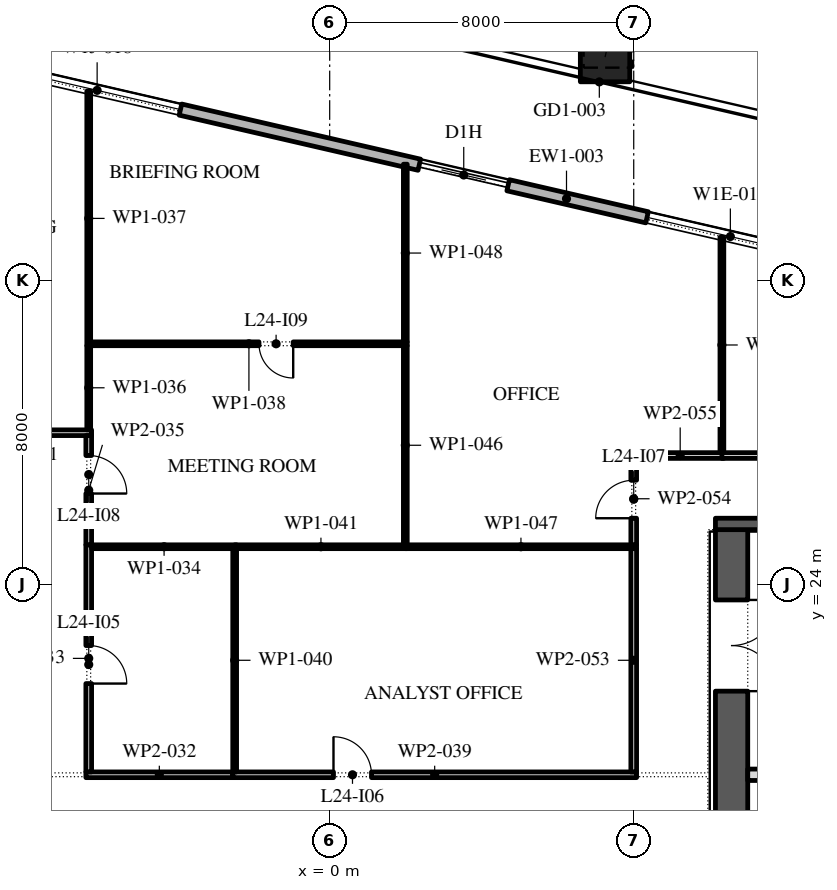
"""IFC4 building model, lengths in metres.
Left out: names, types, materials, properties, quantities, classifications, styles, units other than length and angle.
Written with IfcOpenShell. Run it as: python <this file> out.ifc"""

import sys

from ifc_helpers import new_model, si_unit, direction, frame, frame_2d, origin, origin_2d, place, context, subcontext, project, spatial, rectangle, extrude, element, fill, save


model = new_model("IFC4")
c1 = context("Model", 3, precision=1e-05, world=origin(), true_north=direction((0.0, 1.0)))
c2 = subcontext(c1, "Body", "Model", "MODEL_VIEW")
j1 = project(units=[si_unit("LENGTHUNIT", "METRE"), si_unit("PLANEANGLEUNIT", "RADIAN")], contexts=[c1])
p1 = place(None, origin())
s1 = spatial("IfcSite", under=j1, at=p1, CompositionType="ELEMENT")
p2 = place(p1, origin())
s2 = spatial("IfcBuilding", under=s1, at=p2, CompositionType="ELEMENT")
p3 = place(p2, frame((0.0, 0.0, 114.0)))
s3 = spatial("IfcBuildingStorey", under=s2, at=p3, CompositionType="ELEMENT", Elevation=114.0)
p4 = place(p3, frame((7.246, 37.884, 0.0), z_axis=(0.020319626563, 0.088225387128, 0.995893264282), x_axis=(-0.974488096918, 0.224439187676, 0.0)))
e1 = element("IfcColumn", 1, at=p4, inside=s3, PredefinedType="COLUMN", context=c2, shape_type="SweptSolid", body=[
    extrude(rectangle(XDim=1.3, YDim=1.3, at=origin_2d()), origin(), (0.0, 0.0, 1.0), 4.217),
])
p5 = place(p3, frame((31.078, 28.421, 0.0), z_axis=(0.0, 0.0, 1.0), x_axis=(-0.974370456532, 0.224949357493, 0.0)))
e2 = element("IfcWall", 2, at=p5, inside=s3, PredefinedType="STANDARD", context=c2, shape_type="SweptSolid", body=[
    extrude(rectangle(XDim=51.0, YDim=0.3, at=frame_2d((25.5, 0.0))), origin(), (0.0, 0.0, 1.0), 4.0),
])
p6 = place(p5, frame((1.875, 0.0, 0.45)))
e3 = element("IfcOpeningElement", 3, at=p6, cuts=e2, PredefinedType="OPENING", context=c2, shape_type="SweptSolid", body=[
    extrude(rectangle(XDim=4.5, YDim=3.0, at=frame_2d((2.25, 1.5))), frame((0.0, 0.16, 0.0), z_axis=(0.0, -1.0, 0.0), x_axis=(1.0, 0.0, 0.0)), (0.0, 0.0, 1.0), 0.32),
])
p7 = place(p5, frame((10.275, 0.0, 0.45)))
e4 = element("IfcOpeningElement", 4, at=p7, cuts=e2, PredefinedType="OPENING", context=c2, shape_type="SweptSolid", body=[
    extrude(rectangle(XDim=4.5, YDim=2.875, at=frame_2d((2.25, 1.438))), frame((0.0, 0.16, 0.0), z_axis=(0.0, -1.0, 0.0), x_axis=(1.0, 0.0, 0.0)), (0.0, 0.0, 1.0), 0.32),
])
p8 = place(p5, frame((18.825, 0.0, 0.45)))
e5 = element("IfcOpeningElement", 5, at=p8, cuts=e2, PredefinedType="OPENING", context=c2, shape_type="SweptSolid", body=[
    extrude(rectangle(XDim=4.5, YDim=2.825, at=frame_2d((2.25, 1.413))), frame((0.0, 0.16, 0.0), z_axis=(0.0, -1.0, 0.0), x_axis=(1.0, 0.0, 0.0)), (0.0, 0.0, 1.0), 0.32),
])
p9 = place(p5, frame((27.075, 0.0, 0.0)))
e6 = element("IfcOpeningElement", 6, at=p9, cuts=e2, PredefinedType="OPENING", context=c2, shape_type="SweptSolid", body=[
    extrude(rectangle(XDim=2.4, YDim=3.2, at=frame_2d((1.2, 1.6))), frame((0.0, 0.16, 0.0), z_axis=(0.0, -1.0, 0.0), x_axis=(1.0, 0.0, 0.0)), (0.0, 0.0, 1.0), 0.32),
])
p10 = place(p5, frame((35.925, 0.0, 0.45)))
e7 = element("IfcOpeningElement", 7, at=p10, cuts=e2, PredefinedType="OPENING", context=c2, shape_type="SweptSolid", body=[
    extrude(rectangle(XDim=4.5, YDim=2.675, at=frame_2d((2.25, 1.337))), frame((0.0, 0.16, 0.0), z_axis=(0.0, -1.0, 0.0), x_axis=(1.0, 0.0, 0.0)), (0.0, 0.0, 1.0), 0.32),
])
p11 = place(p5, frame((44.475, 0.0, 0.45)))
e8 = element("IfcOpeningElement", 8, at=p11, cuts=e2, PredefinedType="OPENING", context=c2, shape_type="SweptSolid", body=[
    extrude(rectangle(XDim=4.5, YDim=3.05, at=frame_2d((2.25, 1.525))), frame((0.0, 0.16, 0.0), z_axis=(0.0, -1.0, 0.0), x_axis=(1.0, 0.0, 0.0)), (0.0, 0.0, 1.0), 0.32),
])
p12 = place(p3, frame((10.575, -2.45, 0.0), z_axis=(0.0, 0.0, 1.0), x_axis=(0.0, 1.0, 0.0)))
e9 = element("IfcWall", 9, at=p12, inside=s3, PredefinedType="SHEAR", context=c2, shape_type="SweptSolid", body=[
    extrude(rectangle(XDim=27.9, YDim=0.85, at=frame_2d((13.95, 0.0))), origin(), (0.0, 0.0, 1.0), 4.0),
])
p13 = place(p12, frame((23.65, 0.0, 0.0)))
e10 = element("IfcOpeningElement", 10, at=p13, cuts=e9, PredefinedType="OPENING", context=c2, shape_type="SweptSolid", body=[
    extrude(rectangle(XDim=2.4, YDim=2.1, at=frame_2d((1.2, 1.05))), frame((0.0, 0.435, 0.0), z_axis=(0.0, -1.0, 0.0), x_axis=(1.0, 0.0, 0.0)), (0.0, 0.0, 1.0), 0.87),
])
p14 = place(p12, frame((1.387, 0.0, 0.0)))
e11 = element("IfcOpeningElement", 11, at=p14, cuts=e9, PredefinedType="OPENING", context=c2, shape_type="SweptSolid", body=[
    extrude(rectangle(XDim=0.9, YDim=2.1, at=frame_2d((0.45, 1.05))), frame((0.0, 0.435, 0.0), z_axis=(0.0, -1.0, 0.0), x_axis=(1.0, 0.0, 0.0)), (0.0, 0.0, 1.0), 0.87),
])
p15 = place(p12, frame((4.562, 0.0, 0.0)))
e12 = element("IfcOpeningElement", 12, at=p15, cuts=e9, PredefinedType="OPENING", context=c2, shape_type="SweptSolid", body=[
    extrude(rectangle(XDim=1.0, YDim=2.1, at=frame_2d((0.5, 1.05))), frame((0.0, 0.435, 0.0), z_axis=(0.0, -1.0, 0.0), x_axis=(1.0, 0.0, 0.0)), (0.0, 0.0, 1.0), 0.87),
])
p16 = place(p3, frame((10.15, 25.6, 0.0), z_axis=(0.0, 0.0, 1.0), x_axis=(1.0, 0.0, 0.0)))
e13 = element("IfcWall", 13, at=p16, inside=s3, PredefinedType="SHEAR", context=c2, shape_type="SweptSolid", body=[
    extrude(rectangle(XDim=11.7, YDim=0.3, at=frame_2d((5.85, 0.0))), origin(), (0.0, 0.0, 1.0), 4.0),
])
p17 = place(p3, frame((11.0, 19.0, 0.0), z_axis=(0.0, 0.0, 1.0), x_axis=(1.0, 0.0, 0.0)))
e14 = element("IfcWall", 14, at=p17, inside=s3, PredefinedType="PARTITIONING", context=c2, shape_type="SweptSolid", body=[
    extrude(rectangle(XDim=3.0, YDim=0.3, at=frame_2d((1.5, 0.0))), origin(), (0.0, 0.0, 1.0), 4.0),
])
p18 = place(p3, frame((-10.27, 28.0, 0.0), z_axis=(0.0, 0.0, 1.0), x_axis=(1.0, 0.0, 0.0)))
e15 = element("IfcWall", 15, at=p18, inside=s3, PredefinedType="PARTITIONING", context=c2, shape_type="SweptSolid", body=[
    extrude(rectangle(XDim=4.005, YDim=0.15, at=frame_2d((2.002, 0.0))), origin(), (0.0, 0.0, 1.0), 4.0),
])
p19 = place(p18, frame((1.78, 0.0, 0.0)))
e16 = element("IfcOpeningElement", 16, at=p19, cuts=e15, PredefinedType="OPENING", context=c2, shape_type="SweptSolid", body=[
    extrude(rectangle(XDim=1.0, YDim=2.1, at=frame_2d((0.5, 1.05))), frame((0.0, 0.085, 0.0), z_axis=(0.0, -1.0, 0.0), x_axis=(1.0, 0.0, 0.0)), (0.0, 0.0, 1.0), 0.17),
])
p20 = place(p3, frame((-6.415, 19.0, 0.0), z_axis=(0.0, 0.0, 1.0), x_axis=(1.0, 0.0, 0.0)))
e17 = element("IfcWall", 17, at=p20, inside=s3, PredefinedType="PARTITIONING", context=c2, shape_type="SweptSolid", body=[
    extrude(rectangle(XDim=3.865, YDim=0.15, at=frame_2d((1.933, 0.0))), origin(), (0.0, 0.0, 1.0), 4.0),
])
p21 = place(p3, frame((-6.34, 25.05, 0.0), z_axis=(0.0, 0.0, 1.0), x_axis=(0.0, -1.0, 0.0)))
e18 = element("IfcWall", 18, at=p21, inside=s3, PredefinedType="PARTITIONING", context=c2, shape_type="SweptSolid", body=[
    extrude(rectangle(XDim=5.975, YDim=0.15, at=frame_2d((2.988, 0.0))), origin(), (0.0, 0.0, 1.0), 4.0),
])
p22 = place(p21, frame((2.65, 0.0, 0.0)))
e19 = element("IfcOpeningElement", 19, at=p22, cuts=e18, PredefinedType="OPENING", context=c2, shape_type="SweptSolid", body=[
    extrude(rectangle(XDim=1.0, YDim=2.1, at=frame_2d((0.5, 1.05))), frame((0.0, 0.085, 0.0), z_axis=(0.0, -1.0, 0.0), x_axis=(1.0, 0.0, 0.0)), (0.0, 0.0, 1.0), 0.17),
])
p23 = place(p3, frame((-6.265, 25.0, 0.0), z_axis=(0.0, 0.0, 1.0), x_axis=(1.0, 0.0, 0.0)))
e20 = element("IfcWall", 20, at=p23, inside=s3, PredefinedType="PARTITIONING", context=c2, shape_type="SweptSolid", body=[
    extrude(rectangle(XDim=3.815, YDim=0.1, at=frame_2d((1.907, 0.0))), origin(), (0.0, 0.0, 1.0), 4.0),
])
p24 = place(p3, frame((-6.34, 27.925, 0.0), z_axis=(0.0, 0.0, 1.0), x_axis=(0.0, -1.0, 0.0)))
e21 = element("IfcWall", 21, at=p24, inside=s3, PredefinedType="PARTITIONING", context=c2, shape_type="SweptSolid", body=[
    extrude(rectangle(XDim=2.875, YDim=0.15, at=frame_2d((1.438, 0.0))), origin(), (0.0, 0.0, 1.0), 4.0),
])
p25 = place(p24, frame((0.525, 0.0, 0.0)))
e22 = element("IfcOpeningElement", 22, at=p25, cuts=e21, PredefinedType="OPENING", context=c2, shape_type="SweptSolid", body=[
    extrude(rectangle(XDim=1.0, YDim=2.1, at=frame_2d((0.5, 1.05))), frame((0.0, 0.085, 0.0), z_axis=(0.0, -1.0, 0.0), x_axis=(1.0, 0.0, 0.0)), (0.0, 0.0, 1.0), 0.17),
])
p26 = place(p3, frame((-6.34, 28.075, 0.0), z_axis=(0.0, 0.0, 1.0), x_axis=(0.0, 1.0, 0.0)))
e23 = element("IfcWall", 23, at=p26, inside=s3, PredefinedType="PARTITIONING", context=c2, shape_type="SweptSolid", body=[
    extrude(rectangle(XDim=2.215, YDim=0.1, at=frame_2d((1.107, 0.0))), origin(), (0.0, 0.0, 1.0), 4.0),
])
p27 = place(p3, frame((-6.34, 30.29, 0.0), z_axis=(0.0, 0.0, 1.0), x_axis=(0.0, 1.0, 0.0)))
e24 = element("IfcWall", 24, at=p27, inside=s3, PredefinedType="PARTITIONING", context=c2, shape_type="SweptSolid", body=[
    extrude(rectangle(XDim=6.698, YDim=0.1, at=frame_2d((3.349, 0.0))), origin(), (0.0, 0.0, 1.0), 4.0),
])
p28 = place(p3, frame((-6.29, 30.34, 0.0), z_axis=(0.0, 0.0, 1.0), x_axis=(1.0, 0.0, 0.0)))
e25 = element("IfcWall", 25, at=p28, inside=s3, PredefinedType="PARTITIONING", context=c2, shape_type="SweptSolid", body=[
    extrude(rectangle(XDim=8.33, YDim=0.1, at=frame_2d((4.165, 0.0))), origin(), (0.0, 0.0, 1.0), 4.0),
])
p29 = place(p28, frame((4.43, 0.0, 0.0)))
e26 = element("IfcOpeningElement", 26, at=p29, cuts=e25, PredefinedType="OPENING", context=c2, shape_type="SweptSolid", body=[
    extrude(rectangle(XDim=0.9, YDim=2.1, at=frame_2d((0.45, 1.05))), frame((0.0, 0.06, 0.0), z_axis=(0.0, -1.0, 0.0), x_axis=(1.0, 0.0, 0.0)), (0.0, 0.0, 1.0), 0.12),
])
p30 = place(p3, frame((-2.55, 19.0, 0.0), z_axis=(0.0, 0.0, 1.0), x_axis=(1.0, 0.0, 0.0)))
e27 = element("IfcWall", 27, at=p30, inside=s3, PredefinedType="PARTITIONING", context=c2, shape_type="SweptSolid", body=[
    extrude(rectangle(XDim=10.625, YDim=0.15, at=frame_2d((5.312, 0.0))), origin(), (0.0, 0.0, 1.0), 4.0),
])
p31 = place(p30, frame((2.65, 0.0, 0.0)))
e28 = element("IfcOpeningElement", 28, at=p31, cuts=e27, PredefinedType="OPENING", context=c2, shape_type="SweptSolid", body=[
    extrude(rectangle(XDim=1.0, YDim=2.1, at=frame_2d((0.5, 1.05))), frame((0.0, 0.085, 0.0), z_axis=(0.0, -1.0, 0.0), x_axis=(1.0, 0.0, 0.0)), (0.0, 0.0, 1.0), 0.17),
])
p32 = place(p3, frame((-2.5, 24.95, 0.0), z_axis=(0.0, 0.0, 1.0), x_axis=(0.0, -1.0, 0.0)))
e29 = element("IfcWall", 29, at=p32, inside=s3, PredefinedType="PARTITIONING", context=c2, shape_type="SweptSolid", body=[
    extrude(rectangle(XDim=5.875, YDim=0.1, at=frame_2d((2.938, 0.0))), origin(), (0.0, 0.0, 1.0), 4.0),
])
p33 = place(p3, frame((-2.5, 25.0, 0.0), z_axis=(0.0, 0.0, 1.0), x_axis=(1.0, 0.0, 0.0)))
e30 = element("IfcWall", 30, at=p33, inside=s3, PredefinedType="PARTITIONING", context=c2, shape_type="SweptSolid", body=[
    extrude(rectangle(XDim=4.54, YDim=0.1, at=frame_2d((2.27, 0.0))), origin(), (0.0, 0.0, 1.0), 4.0),
])
p34 = place(p3, frame((1.99, 25.05, 0.0), z_axis=(0.0, 0.0, 1.0), x_axis=(0.0, 1.0, 0.0)))
e31 = element("IfcWall", 31, at=p34, inside=s3, PredefinedType="PARTITIONING", context=c2, shape_type="SweptSolid", body=[
    extrude(rectangle(XDim=5.24, YDim=0.1, at=frame_2d((2.62, 0.0))), origin(), (0.0, 0.0, 1.0), 4.0),
])
p35 = place(p3, frame((1.99, 25.0, 0.0), z_axis=(0.0, 0.0, 1.0), x_axis=(1.0, 0.0, 0.0)))
e32 = element("IfcWall", 32, at=p35, inside=s3, PredefinedType="PARTITIONING", context=c2, shape_type="SweptSolid", body=[
    extrude(rectangle(XDim=6.085, YDim=0.1, at=frame_2d((3.042, 0.0))), origin(), (0.0, 0.0, 1.0), 4.0),
])
p36 = place(p3, frame((1.99, 30.39, 0.0), z_axis=(0.0, 0.0, 1.0), x_axis=(0.0, 1.0, 0.0)))
e33 = element("IfcWall", 33, at=p36, inside=s3, PredefinedType="PARTITIONING", context=c2, shape_type="SweptSolid", body=[
    extrude(rectangle(XDim=4.675, YDim=0.1, at=frame_2d((2.337, 0.0))), origin(), (0.0, 0.0, 1.0), 4.0),
])
p37 = place(p3, frame((8.0, 19.075, 0.0), z_axis=(0.0, 0.0, 1.0), x_axis=(0.0, 1.0, 0.0)))
e34 = element("IfcWall", 34, at=p37, inside=s3, PredefinedType="PARTITIONING", context=c2, shape_type="SweptSolid", body=[
    extrude(rectangle(XDim=5.875, YDim=0.15, at=frame_2d((2.938, 0.0))), origin(), (0.0, 0.0, 1.0), 4.0),
])
p38 = place(p3, frame((8.0, 25.05, 0.0), z_axis=(0.0, 0.0, 1.0), x_axis=(0.0, 1.0, 0.0)))
e35 = element("IfcWall", 35, at=p38, inside=s3, PredefinedType="PARTITIONING", context=c2, shape_type="SweptSolid", body=[
    extrude(rectangle(XDim=2.425, YDim=0.15, at=frame_2d((1.212, 0.0))), origin(), (0.0, 0.0, 1.0), 4.0),
])
p39 = place(p38, frame((0.7, 0.0, 0.0)))
e36 = element("IfcOpeningElement", 36, at=p39, cuts=e35, PredefinedType="OPENING", context=c2, shape_type="SweptSolid", body=[
    extrude(rectangle(XDim=1.0, YDim=2.1, at=frame_2d((0.5, 1.05))), frame((0.0, 0.085, 0.0), z_axis=(0.0, -1.0, 0.0), x_axis=(1.0, 0.0, 0.0)), (0.0, 0.0, 1.0), 0.17),
])
p40 = place(p3, frame((8.075, 27.4, 0.0), z_axis=(0.0, 0.0, 1.0), x_axis=(1.0, 0.0, 0.0)))
e37 = element("IfcWall", 37, at=p40, inside=s3, PredefinedType="PARTITIONING", context=c2, shape_type="SweptSolid", body=[
    extrude(rectangle(XDim=2.295, YDim=0.15, at=frame_2d((1.147, 0.0))), origin(), (0.0, 0.0, 1.0), 4.0),
])
p41 = place(p3, frame((10.32, 27.475, 0.0), z_axis=(0.0, 0.0, 1.0), x_axis=(0.0, 1.0, 0.0)))
e38 = element("IfcWall", 38, at=p41, inside=s3, PredefinedType="PARTITIONING", context=c2, shape_type="SweptSolid", body=[
    extrude(rectangle(XDim=5.667, YDim=0.1, at=frame_2d((2.833, 0.0))), origin(), (0.0, 0.0, 1.0), 4.0),
])
p42 = place(p3, frame((10.32, 27.4, 0.0), z_axis=(0.0, 0.0, 1.0), x_axis=(1.0, 0.0, 0.0)))
e39 = element("IfcWall", 39, at=p42, inside=s3, PredefinedType="PARTITIONING", context=c2, shape_type="SweptSolid", body=[
    extrude(rectangle(XDim=8.38, YDim=0.15, at=frame_2d((4.19, 0.0))), origin(), (0.0, 0.0, 1.0), 4.0),
])
p43 = place(p42, frame((4.43, 0.0, 0.0)))
e40 = element("IfcOpeningElement", 40, at=p43, cuts=e39, PredefinedType="OPENING", context=c2, shape_type="SweptSolid", body=[
    extrude(rectangle(XDim=1.0, YDim=2.1, at=frame_2d((0.5, 1.05))), frame((0.0, 0.085, 0.0), z_axis=(0.0, -1.0, 0.0), x_axis=(1.0, 0.0, 0.0)), (0.0, 0.0, 1.0), 0.17),
])
p44 = place(p8, origin())
e41 = element("IfcWindow", 41, at=p44, inside=s3, PartitioningType="DOUBLE_PANEL_VERTICAL", PredefinedType="WINDOW", context=c2, shape_type="SweptSolid", body=[
    extrude(rectangle(XDim=4.5, YDim=2.825, at=frame_2d((2.25, 1.413))), frame((0.0, 0.03, 0.0), z_axis=(0.0, -1.0, 0.0), x_axis=(1.0, 0.0, 0.0)), (0.0, 0.0, 1.0), 0.06),
])
fill(e5, e41)
p45 = place(p9, origin())
e42 = element("IfcDoor", 42, at=p45, inside=s3, OperationType="DOUBLE_DOOR_SLIDING", PredefinedType="DOOR", context=c2, shape_type="SweptSolid", body=[
    extrude(rectangle(XDim=2.4, YDim=3.2, at=frame_2d((1.2, 1.6))), frame((0.0, 0.025, 0.0), z_axis=(0.0, -1.0, 0.0), x_axis=(1.0, 0.0, 0.0)), (0.0, 0.0, 1.0), 0.05),
])
fill(e6, e42)
p46 = place(p10, origin())
e43 = element("IfcWindow", 43, at=p46, inside=s3, PartitioningType="DOUBLE_PANEL_VERTICAL", PredefinedType="WINDOW", context=c2, shape_type="SweptSolid", body=[
    extrude(rectangle(XDim=4.5, YDim=2.675, at=frame_2d((2.25, 1.337))), frame((0.0, 0.03, 0.0), z_axis=(0.0, -1.0, 0.0), x_axis=(1.0, 0.0, 0.0)), (0.0, 0.0, 1.0), 0.06),
])
fill(e7, e43)
p47 = place(p13, frame((2.4, 0.0, 0.0), z_axis=(0.0, 0.0, 1.0), x_axis=(-1.0, 0.0, 0.0)))
e44 = element("IfcDoor", 44, at=p47, inside=s3, OperationType="DOUBLE_DOOR_SINGLE_SWING", PredefinedType="DOOR", context=c2, shape_type="SweptSolid", body=[
    extrude(rectangle(XDim=2.4, YDim=2.1, at=frame_2d((1.2, 1.05))), frame((0.0, 0.025, 0.0), z_axis=(0.0, -1.0, 0.0), x_axis=(1.0, 0.0, 0.0)), (0.0, 0.0, 1.0), 0.05),
])
fill(e10, e44)
p48 = place(p22, origin())
e45 = element("IfcDoor", 45, at=p48, inside=s3, OperationType="SINGLE_SWING_LEFT", PredefinedType="DOOR", context=c2, shape_type="SweptSolid", body=[
    extrude(rectangle(XDim=1.0, YDim=2.1, at=frame_2d((0.5, 1.05))), frame((0.0, 0.025, 0.0), z_axis=(0.0, -1.0, 0.0), x_axis=(1.0, 0.0, 0.0)), (0.0, 0.0, 1.0), 0.05),
])
fill(e19, e45)
p49 = place(p31, origin())
e46 = element("IfcDoor", 46, at=p49, inside=s3, OperationType="SINGLE_SWING_RIGHT", PredefinedType="DOOR", context=c2, shape_type="SweptSolid", body=[
    extrude(rectangle(XDim=1.0, YDim=2.1, at=frame_2d((0.5, 1.05))), frame((0.0, 0.025, 0.0), z_axis=(0.0, -1.0, 0.0), x_axis=(1.0, 0.0, 0.0)), (0.0, 0.0, 1.0), 0.05),
])
fill(e28, e46)
p50 = place(p39, origin())
e47 = element("IfcDoor", 47, at=p50, inside=s3, OperationType="SINGLE_SWING_RIGHT", PredefinedType="DOOR", context=c2, shape_type="SweptSolid", body=[
    extrude(rectangle(XDim=1.0, YDim=2.1, at=frame_2d((0.5, 1.05))), frame((0.0, 0.025, 0.0), z_axis=(0.0, -1.0, 0.0), x_axis=(1.0, 0.0, 0.0)), (0.0, 0.0, 1.0), 0.05),
])
fill(e36, e47)
p51 = place(p25, origin())
e48 = element("IfcDoor", 48, at=p51, inside=s3, OperationType="SINGLE_SWING_LEFT", PredefinedType="DOOR", context=c2, shape_type="SweptSolid", body=[
    extrude(rectangle(XDim=1.0, YDim=2.1, at=frame_2d((0.5, 1.05))), frame((0.0, 0.025, 0.0), z_axis=(0.0, -1.0, 0.0), x_axis=(1.0, 0.0, 0.0)), (0.0, 0.0, 1.0), 0.05),
])
fill(e22, e48)
p52 = place(p29, frame((0.9, 0.0, 0.0), z_axis=(0.0, 0.0, 1.0), x_axis=(-1.0, 0.0, 0.0)))
e49 = element("IfcDoor", 49, at=p52, inside=s3, OperationType="SINGLE_SWING_RIGHT", PredefinedType="DOOR", context=c2, shape_type="SweptSolid", body=[
    extrude(rectangle(XDim=0.9, YDim=2.1, at=frame_2d((0.45, 1.05))), frame((0.0, 0.025, 0.0), z_axis=(0.0, -1.0, 0.0), x_axis=(1.0, 0.0, 0.0)), (0.0, 0.0, 1.0), 0.05),
])
fill(e26, e49)
save(model, sys.argv[1])
